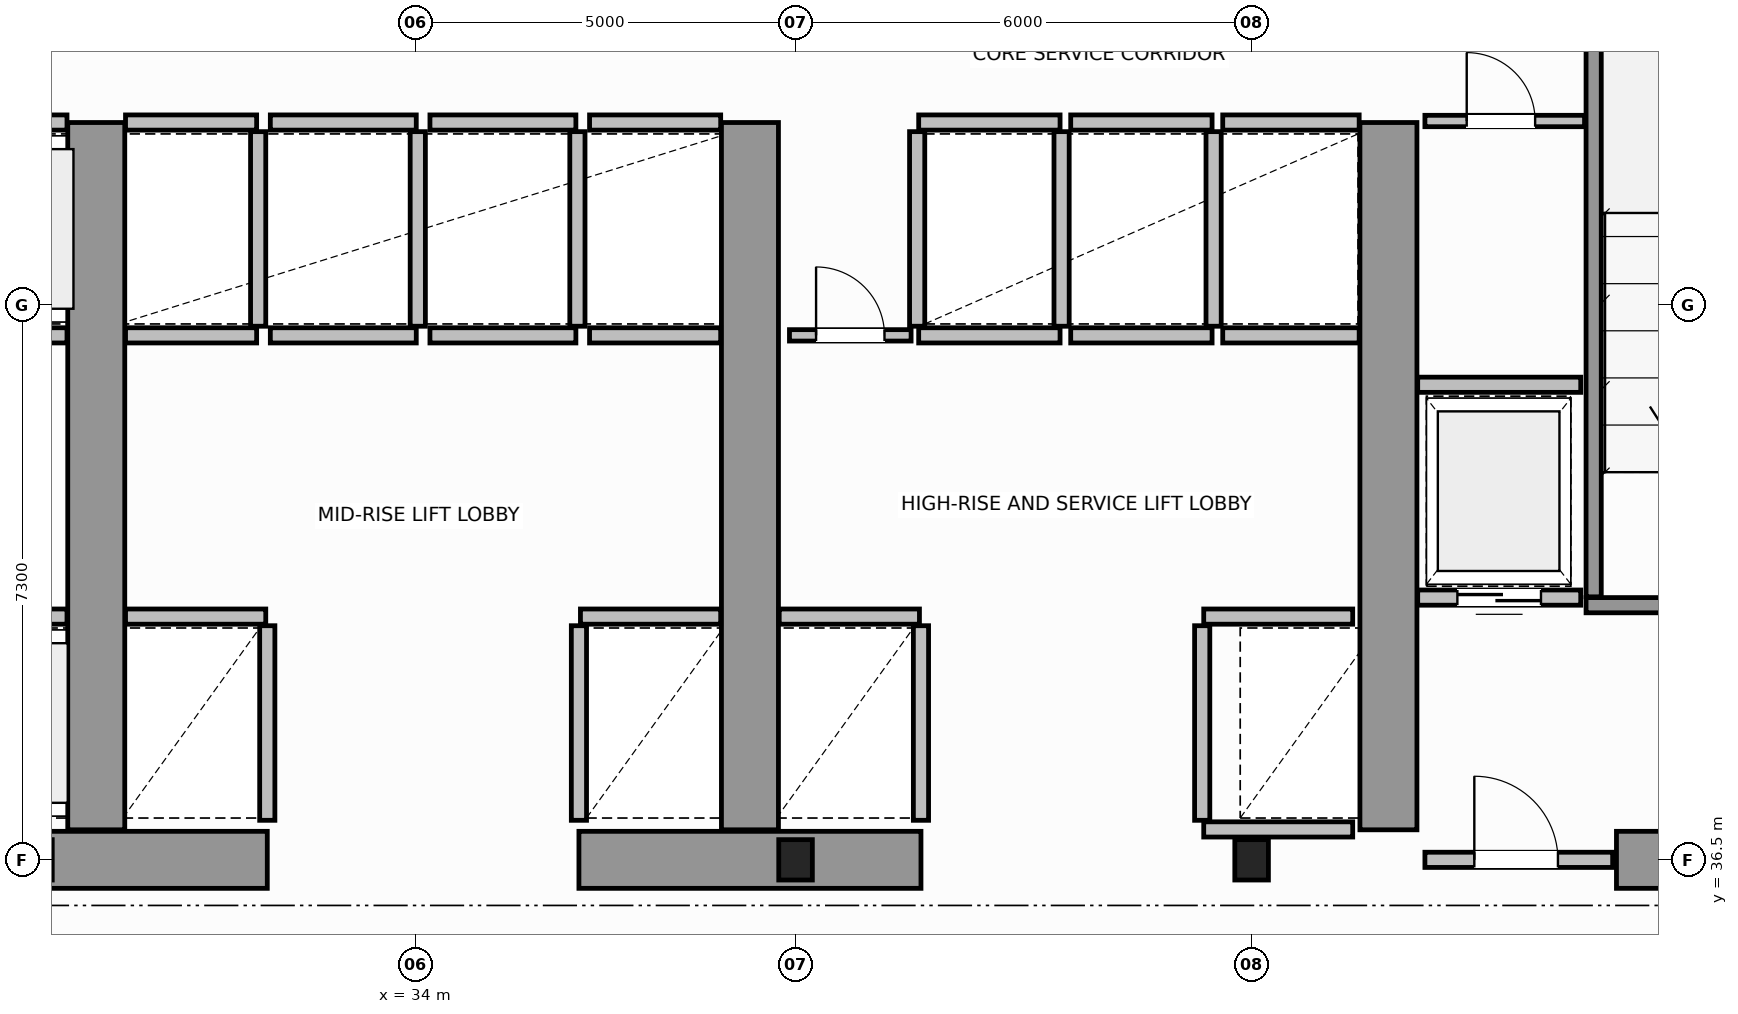
"""IFC4 building model, lengths in metres.
Left out: names, types, materials, properties, quantities, classifications, styles, units other than length and angle.
Written with IfcOpenShell. Run it as: python <this file> out.ifc"""

import sys

from ifc_helpers import new_model, si_unit, direction, frame, frame_2d, origin, origin_2d, place, context, subcontext, project, spatial, rectangle, i_section, extrude, source, transform, mapped, element, fill, save


model = new_model("IFC4")
c1 = context("Model", 3, precision=1e-05, world=origin(), true_north=direction((0.0, 1.0)))
c2 = subcontext(c1, "Body", "Model", "MODEL_VIEW")
j1 = project(units=[si_unit("LENGTHUNIT", "METRE"), si_unit("PLANEANGLEUNIT", "RADIAN")], contexts=[c1])
p1 = place(None, origin())
s1 = spatial("IfcSite", under=j1, at=p1, CompositionType="ELEMENT")
p2 = place(p1, origin())
s2 = spatial("IfcBuilding", under=s1, at=p2, CompositionType="ELEMENT")
p3 = place(p2, frame((0.0, 0.0, 95.8)))
s3 = spatial("IfcBuildingStorey", under=s2, at=p3, CompositionType="ELEMENT", Elevation=95.8)
m1 = source(origin(), c2, "Body", "SweptSolid", [
    extrude(i_section(OverallWidth=0.442, OverallDepth=0.531, WebThickness=0.065, FlangeThickness=0.076, FilletRadius=0.015, at=origin_2d()), origin(), (0.0, 0.0, 1.0), 3.8),
])
for number, where, z_axis, x_axis in (
    (1, (39.0, 36.5, 0.0), (0.0, 0.0, 1.0), (1.0, 0.0, 0.0)),
    (2, (45.0, 36.5, 0.0), (0.0, 0.0, 1.0), (1.0, 0.0, 0.0)),
):
    element("IfcColumn", number, at=place(p3, frame(where, z_axis=z_axis, x_axis=x_axis)), inside=s3, PredefinedType="COLUMN", context=c2, shape_type="MappedRepresentation", body=[
        mapped(m1, transform((0.0, 0.0, 0.0), scale=1.0)),
    ])
for number, where, z_axis, x_axis in (
    (3, (27.55, 36.5, 0.0), (0.0, 0.0, 1.0), (1.0, 0.0, 0.0)),
    (4, (36.15, 36.5, 0.0), (0.0, 0.0, 1.0), (1.0, 0.0, 0.0)),
):
    element("IfcWall", number, at=place(p3, frame(where, z_axis=z_axis, x_axis=x_axis)), inside=s3, PredefinedType="SHEAR", context=c2, shape_type="SweptSolid", body=[
        extrude(rectangle(XDim=4.5, YDim=0.75, at=frame_2d((2.25, 0.0))), origin(), (0.0, 0.0, 1.0), 3.8),
    ])
p4 = place(p3, frame((49.8, 36.5, 0.0), z_axis=(0.0, 0.0, 1.0), x_axis=(1.0, 0.0, 0.0)))
e5 = element("IfcWall", 5, at=p4, inside=s3, PredefinedType="SHEAR", context=c2, shape_type="SweptSolid", body=[
    extrude(rectangle(XDim=3.805, YDim=0.75, at=frame_2d((1.902, 0.0))), origin(), (0.0, 0.0, 1.0), 2.38),
])
for number, where, z_axis, x_axis in (
    (6, (29.8, 36.895, 0.0), (0.0, 0.0, 1.0), (0.0, 1.0, 0.0)),
    (7, (38.4, 36.895, 0.0), (0.0, 0.0, 1.0), (0.0, 1.0, 0.0)),
    (8, (46.8, 36.895, 0.0), (0.0, 0.0, 1.0), (0.0, 1.0, 0.0)),
):
    element("IfcWall", number, at=place(p3, frame(where, z_axis=z_axis, x_axis=x_axis)), inside=s3, PredefinedType="SHEAR", context=c2, shape_type="SweptSolid", body=[
        extrude(rectangle(XDim=9.305, YDim=0.75, at=frame_2d((4.652, 0.0))), origin(), (0.0, 0.0, 1.0), 3.8),
    ])
p5 = place(p3, frame((49.4, 39.85, 0.0), z_axis=(0.0, 0.0, 1.0), x_axis=(1.0, 0.0, 0.0)))
e9 = element("IfcWall", 9, at=p5, inside=s3, PredefinedType="SOLIDWALL", context=c2, shape_type="SweptSolid", body=[
    extrude(rectangle(XDim=4.225, YDim=0.2, at=frame_2d((2.113, 0.0))), origin(), (0.0, 0.0, 1.0), 3.8),
])
p6 = place(p5, frame((1.325, 0.0, 0.0)))
e10 = element("IfcOpeningElement", 10, at=p6, cuts=e9, PredefinedType="OPENING", context=c2, shape_type="SweptSolid", body=[
    extrude(rectangle(XDim=1.1, YDim=2.15, at=frame_2d((0.55, 1.075))), frame((0.0, 0.11, 0.0), z_axis=(0.0, -1.0, 0.0), x_axis=(1.0, 0.0, 0.0)), (0.0, 0.0, 1.0), 0.22),
])
p7 = place(p3, frame((49.5, 39.96, 0.0), z_axis=(0.0, 0.0, 1.0), x_axis=(0.0, 1.0, 0.0)))
e11 = element("IfcWall", 11, at=p7, inside=s3, PredefinedType="SOLIDWALL", context=c2, shape_type="SweptSolid", body=[
    extrude(rectangle(XDim=9.93, YDim=0.2, at=frame_2d((4.965, 0.0))), origin(), (0.0, 0.0, 1.0), 3.8),
])
p8 = place(p3, frame((47.28, 36.5, 0.0), z_axis=(0.0, 0.0, 1.0), x_axis=(1.0, 0.0, 0.0)))
e12 = element("IfcWall", 12, at=p8, inside=s3, PredefinedType="SOLIDWALL", context=c2, shape_type="SweptSolid", body=[
    extrude(rectangle(XDim=2.47, YDim=0.2, at=frame_2d((1.235, 0.0))), origin(), (0.0, 0.0, 1.0), 2.37),
])
p9 = place(p8, frame((0.65, 0.0, 0.0)))
e13 = element("IfcOpeningElement", 13, at=p9, cuts=e12, PredefinedType="OPENING", context=c2, shape_type="SweptSolid", body=[
    extrude(rectangle(XDim=1.1, YDim=2.15, at=frame_2d((0.55, 1.075))), frame((0.0, 0.11, 0.0), z_axis=(0.0, -1.0, 0.0), x_axis=(1.0, 0.0, 0.0)), (0.0, 0.0, 1.0), 0.22),
])
p10 = place(p3, frame((27.57, 39.7, 0.0), z_axis=(0.0, 0.0, 1.0), x_axis=(1.0, 0.0, 0.0)))
e14 = element("IfcWall", 14, at=p10, inside=s3, PredefinedType="SOLIDWALL", context=c2, shape_type="SweptSolid", body=[
    extrude(rectangle(XDim=1.845, YDim=0.2, at=frame_2d((0.922, 0.0))), origin(), (0.0, 0.0, 1.0), 3.58),
])
p11 = place(p10, frame((0.372, 0.0, 0.0)))
e15 = element("IfcOpeningElement", 15, at=p11, cuts=e14, PredefinedType="OPENING", context=c2, shape_type="SweptSolid", body=[
    extrude(rectangle(XDim=1.1, YDim=2.15, at=frame_2d((0.55, 1.075))), frame((0.0, 0.11, 0.0), z_axis=(0.0, -1.0, 0.0), x_axis=(1.0, 0.0, 0.0)), (0.0, 0.0, 1.0), 0.22),
])
p12 = place(p3, frame((27.69, 43.4, 0.0), z_axis=(0.0, 0.0, 1.0), x_axis=(1.0, 0.0, 0.0)))
e16 = element("IfcWall", 16, at=p12, inside=s3, PredefinedType="SOLIDWALL", context=c2, shape_type="SweptSolid", body=[
    extrude(rectangle(XDim=1.725, YDim=0.2, at=frame_2d((0.863, 0.0))), origin(), (0.0, 0.0, 1.0), 3.58),
])
p13 = place(p12, frame((0.312, 0.0, 0.0)))
e17 = element("IfcOpeningElement", 17, at=p13, cuts=e16, PredefinedType="OPENING", context=c2, shape_type="SweptSolid", body=[
    extrude(rectangle(XDim=1.1, YDim=2.15, at=frame_2d((0.55, 1.075))), frame((0.0, 0.11, 0.0), z_axis=(0.0, -1.0, 0.0), x_axis=(1.0, 0.0, 0.0)), (0.0, 0.0, 1.0), 0.22),
])
p14 = place(p3, frame((27.69, 46.2, 0.0), z_axis=(0.0, 0.0, 1.0), x_axis=(1.0, 0.0, 0.0)))
e18 = element("IfcWall", 18, at=p14, inside=s3, PredefinedType="SOLIDWALL", context=c2, shape_type="SweptSolid", body=[
    extrude(rectangle(XDim=1.725, YDim=0.2, at=frame_2d((0.863, 0.0))), origin(), (0.0, 0.0, 1.0), 3.58),
])
p15 = place(p3, frame((30.185, 39.7, 0.0), z_axis=(0.0, 0.0, 1.0), x_axis=(1.0, 0.0, 0.0)))
e19 = element("IfcWall", 19, at=p15, inside=s3, PredefinedType="SOLIDWALL", context=c2, shape_type="SweptSolid", body=[
    extrude(rectangle(XDim=1.845, YDim=0.2, at=frame_2d((0.922, 0.0))), origin(), (0.0, 0.0, 1.0), 3.58),
])
p16 = place(p3, frame((32.05, 37.02, 0.0), z_axis=(0.0, 0.0, 1.0), x_axis=(0.0, 1.0, 0.0)))
e20 = element("IfcWall", 20, at=p16, inside=s3, PredefinedType="SOLIDWALL", context=c2, shape_type="SweptSolid", body=[
    extrude(rectangle(XDim=2.56, YDim=0.2, at=frame_2d((1.28, 0.0))), origin(), (0.0, 0.0, 1.0), 3.58),
])
p17 = place(p3, frame((36.17, 39.7, 0.0), z_axis=(0.0, 0.0, 1.0), x_axis=(1.0, 0.0, 0.0)))
e21 = element("IfcWall", 21, at=p17, inside=s3, PredefinedType="SOLIDWALL", context=c2, shape_type="SweptSolid", body=[
    extrude(rectangle(XDim=1.845, YDim=0.2, at=frame_2d((0.922, 0.0))), origin(), (0.0, 0.0, 1.0), 3.58),
])
p18 = place(p3, frame((36.15, 37.02, 0.0), z_axis=(0.0, 0.0, 1.0), x_axis=(0.0, 1.0, 0.0)))
e22 = element("IfcWall", 22, at=p18, inside=s3, PredefinedType="SOLIDWALL", context=c2, shape_type="SweptSolid", body=[
    extrude(rectangle(XDim=2.56, YDim=0.2, at=frame_2d((1.28, 0.0))), origin(), (0.0, 0.0, 1.0), 3.58),
])
for number, where, z_axis, x_axis in (
    (23, (30.185, 43.4, 0.0), (0.0, 0.0, 1.0), (1.0, 0.0, 0.0)),
    (24, (30.185, 46.2, 0.0), (0.0, 0.0, 1.0), (1.0, 0.0, 0.0)),
):
    element("IfcWall", number, at=place(p3, frame(where, z_axis=z_axis, x_axis=x_axis)), inside=s3, PredefinedType="SOLIDWALL", context=c2, shape_type="SweptSolid", body=[
        extrude(rectangle(XDim=1.725, YDim=0.2, at=frame_2d((0.862, 0.0))), origin(), (0.0, 0.0, 1.0), 3.58),
    ])
p19 = place(p3, frame((31.93, 43.52, 0.0), z_axis=(0.0, 0.0, 1.0), x_axis=(0.0, 1.0, 0.0)))
e25 = element("IfcWall", 25, at=p19, inside=s3, PredefinedType="SOLIDWALL", context=c2, shape_type="SweptSolid", body=[
    extrude(rectangle(XDim=2.56, YDim=0.2, at=frame_2d((1.28, 0.0))), origin(), (0.0, 0.0, 1.0), 3.58),
])
for number, where, z_axis, x_axis in (
    (26, (32.09, 43.4, 0.0), (0.0, 0.0, 1.0), (1.0, 0.0, 0.0)),
    (27, (32.09, 46.2, 0.0), (0.0, 0.0, 1.0), (1.0, 0.0, 0.0)),
):
    element("IfcWall", number, at=place(p3, frame(where, z_axis=z_axis, x_axis=x_axis)), inside=s3, PredefinedType="SOLIDWALL", context=c2, shape_type="SweptSolid", body=[
        extrude(rectangle(XDim=1.92, YDim=0.2, at=frame_2d((0.96, 0.0))), origin(), (0.0, 0.0, 1.0), 3.58),
    ])
p20 = place(p3, frame((34.03, 43.52, 0.0), z_axis=(0.0, 0.0, 1.0), x_axis=(0.0, 1.0, 0.0)))
e28 = element("IfcWall", 28, at=p20, inside=s3, PredefinedType="SOLIDWALL", context=c2, shape_type="SweptSolid", body=[
    extrude(rectangle(XDim=2.56, YDim=0.2, at=frame_2d((1.28, 0.0))), origin(), (0.0, 0.0, 1.0), 3.58),
])
for number, where, z_axis, x_axis in (
    (29, (34.19, 43.4, 0.0), (0.0, 0.0, 1.0), (1.0, 0.0, 0.0)),
    (30, (34.19, 46.2, 0.0), (0.0, 0.0, 1.0), (1.0, 0.0, 0.0)),
):
    element("IfcWall", number, at=place(p3, frame(where, z_axis=z_axis, x_axis=x_axis)), inside=s3, PredefinedType="SOLIDWALL", context=c2, shape_type="SweptSolid", body=[
        extrude(rectangle(XDim=1.92, YDim=0.2, at=frame_2d((0.96, 0.0))), origin(), (0.0, 0.0, 1.0), 3.58),
    ])
p21 = place(p3, frame((36.13, 43.52, 0.0), z_axis=(0.0, 0.0, 1.0), x_axis=(0.0, 1.0, 0.0)))
e31 = element("IfcWall", 31, at=p21, inside=s3, PredefinedType="SOLIDWALL", context=c2, shape_type="SweptSolid", body=[
    extrude(rectangle(XDim=2.56, YDim=0.2, at=frame_2d((1.28, 0.0))), origin(), (0.0, 0.0, 1.0), 3.58),
])
for number, where, z_axis, x_axis in (
    (32, (36.29, 43.4, 0.0), (0.0, 0.0, 1.0), (1.0, 0.0, 0.0)),
    (33, (36.29, 46.2, 0.0), (0.0, 0.0, 1.0), (1.0, 0.0, 0.0)),
):
    element("IfcWall", number, at=place(p3, frame(where, z_axis=z_axis, x_axis=x_axis)), inside=s3, PredefinedType="SOLIDWALL", context=c2, shape_type="SweptSolid", body=[
        extrude(rectangle(XDim=1.725, YDim=0.2, at=frame_2d((0.862, 0.0))), origin(), (0.0, 0.0, 1.0), 3.58),
    ])
p22 = place(p3, frame((38.785, 39.7, 0.0), z_axis=(0.0, 0.0, 1.0), x_axis=(1.0, 0.0, 0.0)))
e34 = element("IfcWall", 34, at=p22, inside=s3, PredefinedType="SOLIDWALL", context=c2, shape_type="SweptSolid", body=[
    extrude(rectangle(XDim=1.845, YDim=0.2, at=frame_2d((0.922, 0.0))), origin(), (0.0, 0.0, 1.0), 3.58),
])
p23 = place(p3, frame((40.65, 37.02, 0.0), z_axis=(0.0, 0.0, 1.0), x_axis=(0.0, 1.0, 0.0)))
e35 = element("IfcWall", 35, at=p23, inside=s3, PredefinedType="SOLIDWALL", context=c2, shape_type="SweptSolid", body=[
    extrude(rectangle(XDim=2.56, YDim=0.2, at=frame_2d((1.28, 0.0))), origin(), (0.0, 0.0, 1.0), 3.58),
])
p24 = place(p3, frame((44.37, 39.7, 0.0), z_axis=(0.0, 0.0, 1.0), x_axis=(1.0, 0.0, 0.0)))
e36 = element("IfcWall", 36, at=p24, inside=s3, PredefinedType="SOLIDWALL", context=c2, shape_type="SweptSolid", body=[
    extrude(rectangle(XDim=1.96, YDim=0.2, at=frame_2d((0.98, 0.0))), origin(), (0.0, 0.0, 1.0), 3.58),
])
p25 = place(p3, frame((44.37, 36.9, 0.0), z_axis=(0.0, 0.0, 1.0), x_axis=(1.0, 0.0, 0.0)))
e37 = element("IfcWall", 37, at=p25, inside=s3, PredefinedType="SOLIDWALL", context=c2, shape_type="SweptSolid", body=[
    extrude(rectangle(XDim=1.96, YDim=0.2, at=frame_2d((0.98, 0.0))), origin(), (0.0, 0.0, 1.0), 2.37),
])
p26 = place(p3, frame((44.35, 37.02, 0.0), z_axis=(0.0, 0.0, 1.0), x_axis=(0.0, 1.0, 0.0)))
e38 = element("IfcWall", 38, at=p26, inside=s3, PredefinedType="SOLIDWALL", context=c2, shape_type="SweptSolid", body=[
    extrude(rectangle(XDim=2.56, YDim=0.2, at=frame_2d((1.28, 0.0))), origin(), (0.0, 0.0, 1.0), 3.58),
])
for number, where, z_axis, x_axis in (
    (39, (40.62, 43.4, 0.0), (0.0, 0.0, 1.0), (1.0, 0.0, 0.0)),
    (40, (40.62, 46.2, 0.0), (0.0, 0.0, 1.0), (1.0, 0.0, 0.0)),
):
    element("IfcWall", number, at=place(p3, frame(where, z_axis=z_axis, x_axis=x_axis)), inside=s3, PredefinedType="SOLIDWALL", context=c2, shape_type="SweptSolid", body=[
        extrude(rectangle(XDim=1.86, YDim=0.2, at=frame_2d((0.93, 0.0))), origin(), (0.0, 0.0, 1.0), 3.58),
    ])
for number, where, z_axis, x_axis in (
    (41, (40.6, 43.52, 0.0), (0.0, 0.0, 1.0), (0.0, 1.0, 0.0)),
    (42, (42.5, 43.52, 0.0), (0.0, 0.0, 1.0), (0.0, 1.0, 0.0)),
):
    element("IfcWall", number, at=place(p3, frame(where, z_axis=z_axis, x_axis=x_axis)), inside=s3, PredefinedType="SOLIDWALL", context=c2, shape_type="SweptSolid", body=[
        extrude(rectangle(XDim=2.56, YDim=0.2, at=frame_2d((1.28, 0.0))), origin(), (0.0, 0.0, 1.0), 3.58),
    ])
for number, where, z_axis, x_axis in (
    (43, (42.62, 43.4, 0.0), (0.0, 0.0, 1.0), (1.0, 0.0, 0.0)),
    (44, (42.62, 46.2, 0.0), (0.0, 0.0, 1.0), (1.0, 0.0, 0.0)),
):
    element("IfcWall", number, at=place(p3, frame(where, z_axis=z_axis, x_axis=x_axis)), inside=s3, PredefinedType="SOLIDWALL", context=c2, shape_type="SweptSolid", body=[
        extrude(rectangle(XDim=1.86, YDim=0.2, at=frame_2d((0.93, 0.0))), origin(), (0.0, 0.0, 1.0), 3.58),
    ])
p27 = place(p3, frame((44.5, 43.52, 0.0), z_axis=(0.0, 0.0, 1.0), x_axis=(0.0, 1.0, 0.0)))
e45 = element("IfcWall", 45, at=p27, inside=s3, PredefinedType="SOLIDWALL", context=c2, shape_type="SweptSolid", body=[
    extrude(rectangle(XDim=2.56, YDim=0.2, at=frame_2d((1.28, 0.0))), origin(), (0.0, 0.0, 1.0), 3.58),
])
for number, where, z_axis, x_axis in (
    (46, (44.62, 43.4, 0.0), (0.0, 0.0, 1.0), (1.0, 0.0, 0.0)),
    (47, (44.62, 46.2, 0.0), (0.0, 0.0, 1.0), (1.0, 0.0, 0.0)),
):
    element("IfcWall", number, at=place(p3, frame(where, z_axis=z_axis, x_axis=x_axis)), inside=s3, PredefinedType="SOLIDWALL", context=c2, shape_type="SweptSolid", body=[
        extrude(rectangle(XDim=1.795, YDim=0.2, at=frame_2d((0.897, 0.0))), origin(), (0.0, 0.0, 1.0), 3.58),
    ])
p28 = place(p3, frame((47.185, 39.95, 0.0), z_axis=(0.0, 0.0, 1.0), x_axis=(1.0, 0.0, 0.0)))
e48 = element("IfcWall", 48, at=p28, inside=s3, PredefinedType="SOLIDWALL", context=c2, shape_type="SweptSolid", body=[
    extrude(rectangle(XDim=2.145, YDim=0.2, at=frame_2d((1.073, 0.0))), origin(), (0.0, 0.0, 1.0), 3.58),
])
p29 = place(p28, frame((0.522, 0.0, 0.0)))
e49 = element("IfcOpeningElement", 49, at=p29, cuts=e48, PredefinedType="OPENING", context=c2, shape_type="SweptSolid", body=[
    extrude(rectangle(XDim=1.1, YDim=2.15, at=frame_2d((0.55, 1.075))), frame((0.0, 0.11, 0.0), z_axis=(0.0, -1.0, 0.0), x_axis=(1.0, 0.0, 0.0)), (0.0, 0.0, 1.0), 0.22),
])
p30 = place(p3, frame((47.185, 42.75, 0.0), z_axis=(0.0, 0.0, 1.0), x_axis=(1.0, 0.0, 0.0)))
e50 = element("IfcWall", 50, at=p30, inside=s3, PredefinedType="SOLIDWALL", context=c2, shape_type="SweptSolid", body=[
    extrude(rectangle(XDim=2.145, YDim=0.2, at=frame_2d((1.073, 0.0))), origin(), (0.0, 0.0, 1.0), 3.58),
])
p31 = place(p3, frame((47.28, 46.22, 0.0), z_axis=(0.0, 0.0, 1.0), x_axis=(1.0, 0.0, 0.0)))
e51 = element("IfcWall", 51, at=p31, inside=s3, PredefinedType="PARTITIONING", context=c2, shape_type="SweptSolid", body=[
    extrude(rectangle(XDim=2.1, YDim=0.15, at=frame_2d((1.05, 0.0))), origin(), (0.0, 0.0, 1.0), 3.58),
])
p32 = place(p31, frame((0.55, 0.0, 0.0)))
e52 = element("IfcOpeningElement", 52, at=p32, cuts=e51, PredefinedType="OPENING", context=c2, shape_type="SweptSolid", body=[
    extrude(rectangle(XDim=0.9, YDim=2.1, at=frame_2d((0.45, 1.05))), frame((0.0, 0.085, 0.0), z_axis=(0.0, -1.0, 0.0), x_axis=(1.0, 0.0, 0.0)), (0.0, 0.0, 1.0), 0.17),
])
p33 = place(p3, frame((38.92, 43.4, 0.0), z_axis=(0.0, 0.0, 1.0), x_axis=(1.0, 0.0, 0.0)))
e53 = element("IfcWall", 53, at=p33, inside=s3, PredefinedType="PARTITIONING", context=c2, shape_type="SweptSolid", body=[
    extrude(rectangle(XDim=1.6, YDim=0.15, at=frame_2d((0.8, 0.0))), origin(), (0.0, 0.0, 1.0), 3.58),
])
p34 = place(p33, frame((0.35, 0.0, 0.0)))
e54 = element("IfcOpeningElement", 54, at=p34, cuts=e53, PredefinedType="OPENING", context=c2, shape_type="SweptSolid", body=[
    extrude(rectangle(XDim=0.9, YDim=2.1, at=frame_2d((0.45, 1.05))), frame((0.0, 0.085, 0.0), z_axis=(0.0, -1.0, 0.0), x_axis=(1.0, 0.0, 0.0)), (0.0, 0.0, 1.0), 0.17),
])
m2 = source(origin(), c2, "Body", "SweptSolid", [
    extrude(rectangle(XDim=1.1, YDim=2.15, at=frame_2d((0.55, 1.075))), frame((0.0, 0.025, 0.0), z_axis=(0.0, -1.0, 0.0), x_axis=(1.0, 0.0, 0.0)), (0.0, 0.0, 1.0), 0.05),
])
p35 = place(p9, origin())
e55 = element("IfcDoor", 55, at=p35, inside=s3, OperationType="SINGLE_SWING_LEFT", PredefinedType="DOOR", context=c2, shape_type="MappedRepresentation", body=[
    mapped(m2, transform((0.0, 0.0, 0.0), scale=1.0)),
])
fill(e13, e55)
p36 = place(p29, origin())
e56 = element("IfcDoor", 56, at=p36, inside=s3, OperationType="DOUBLE_DOOR_SLIDING", PredefinedType="DOOR", context=c2, shape_type="MappedRepresentation", body=[
    mapped(m2, transform((0.0, 0.0, 0.0), scale=1.0)),
])
fill(e49, e56)
m3 = source(origin(), c2, "Body", "SweptSolid", [
    extrude(rectangle(XDim=0.9, YDim=2.1, at=frame_2d((0.45, 1.05))), frame((0.0, 0.025, 0.0), z_axis=(0.0, -1.0, 0.0), x_axis=(1.0, 0.0, 0.0)), (0.0, 0.0, 1.0), 0.05),
])
p37 = place(p32, origin())
e57 = element("IfcDoor", 57, at=p37, inside=s3, OperationType="SINGLE_SWING_RIGHT", PredefinedType="DOOR", context=c2, shape_type="MappedRepresentation", body=[
    mapped(m3, transform((0.0, 0.0, 0.0), scale=1.0)),
])
fill(e52, e57)
p38 = place(p34, origin())
e58 = element("IfcDoor", 58, at=p38, inside=s3, OperationType="SINGLE_SWING_LEFT", PredefinedType="DOOR", context=c2, shape_type="MappedRepresentation", body=[
    mapped(m3, transform((0.0, 0.0, 0.0), scale=1.0)),
])
fill(e54, e58)
save(model, sys.argv[1])
